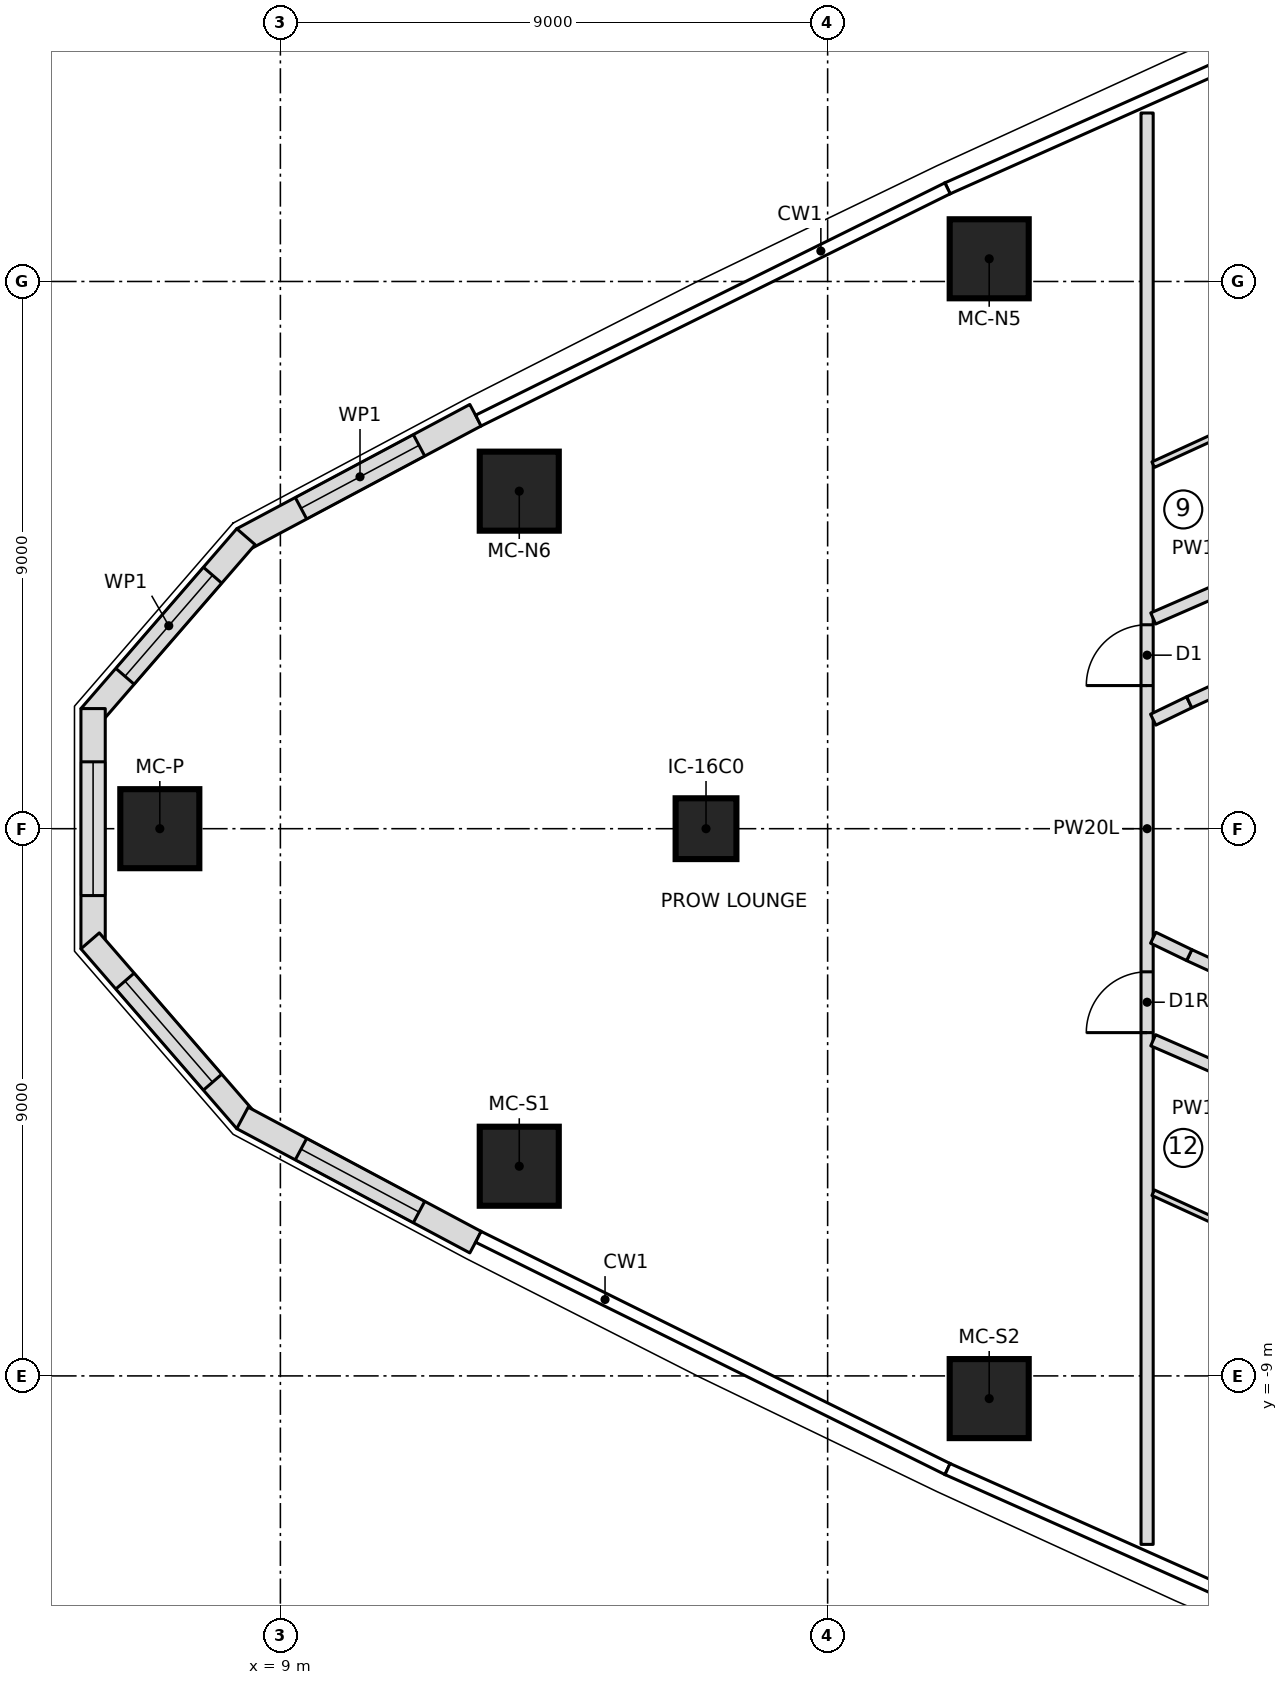
"""IFC4 building model, lengths in metres.
Left out: names, types, materials, properties, quantities, classifications, styles, units other than length and angle.
Written with IfcOpenShell. Run it as: python <this file> out.ifc"""

import sys

from ifc_helpers import new_model, si_unit, direction, frame, frame_2d, origin, origin_2d, place, context, subcontext, project, spatial, polyline, rectangle, outline, extrude, element, fill, save


model = new_model("IFC4")
c1 = context("Model", 3, precision=1e-05, world=origin(), true_north=direction((0.0, 1.0)))
c2 = subcontext(c1, "Body", "Model", "MODEL_VIEW")
j1 = project(units=[si_unit("LENGTHUNIT", "METRE"), si_unit("PLANEANGLEUNIT", "RADIAN")], contexts=[c1])
p1 = place(None, origin())
s1 = spatial("IfcSite", under=j1, at=p1, CompositionType="ELEMENT")
p2 = place(p1, origin())
s2 = spatial("IfcBuilding", under=s1, at=p2, CompositionType="ELEMENT")
p3 = place(p2, frame((0.0, 0.0, 189.7)))
s3 = spatial("IfcBuildingStorey", under=s2, at=p3, CompositionType="ELEMENT", Elevation=189.7)
for number, where, z_axis, x_axis in (
    (1, (7.017, 0.0, 0.0), (0.0, 0.0, 1.0), (1.0, 0.0, 0.0)),
    (2, (12.929, -5.552, 0.0), (0.0, 0.0, 1.0), (1.0, 0.0, 0.0)),
    (3, (20.657, -9.373, 0.0), (0.0, 0.0, 1.0), (1.0, 0.0, 0.0)),
    (4, (20.657, 9.373, 0.0), (0.0, 0.0, 1.0), (1.0, 0.0, 0.0)),
    (5, (12.929, 5.552, 0.0), (0.0, 0.0, 1.0), (1.0, 0.0, 0.0)),
):
    element("IfcColumn", number, at=place(p3, frame(where, z_axis=z_axis, x_axis=x_axis)), inside=s3, PredefinedType="COLUMN", context=c2, shape_type="SweptSolid", body=[
        extrude(rectangle(XDim=1.3, YDim=1.3, at=origin_2d()), origin(), (0.0, 0.0, 1.0), 3.55),
    ])
p4 = place(p3, frame((16.0, 0.0, 0.0), z_axis=(0.0, 0.0, 1.0), x_axis=(1.0, 0.0, 0.0)))
e6 = element("IfcColumn", 6, at=p4, inside=s3, PredefinedType="COLUMN", context=c2, shape_type="SweptSolid", body=[
    extrude(rectangle(XDim=1.0, YDim=1.0, at=origin_2d()), origin(), (0.0, 0.0, 1.0), 3.55),
])
p5 = place(p3, frame((12.21, 6.801, 0.0), z_axis=(0.0, 0.0, 1.0), x_axis=(-0.882385889746, -0.470526451518, 0.0)))
e7 = element("IfcWall", 7, at=p5, inside=s3, PredefinedType="NOTDEFINED", context=c2, shape_type="SweptSolid", body=[
    extrude(outline(polyline([(0.0, -0.2), (4.344, -0.2), (4.27, 0.2), (0.0, 0.2), (0.0, -0.2)])), origin(), (0.0, 0.0, 1.0), 3.25),
])
p6 = place(p5, frame((1.053, 0.0, 0.6)))
e8 = element("IfcOpeningElement", 8, at=p6, cuts=e7, PredefinedType="OPENING", context=c2, shape_type="SweptSolid", body=[
    extrude(outline(polyline([(0.0, 1.35), (0.084, 1.771), (0.322, 2.128), (0.679, 2.366), (1.1, 2.45), (1.521, 2.366), (1.878, 2.128), (2.116, 1.771), (2.2, 1.35), (2.2, 1.1), (2.116, 0.679), (1.878, 0.322), (1.521, 0.084), (1.1, 0.0), (0.679, 0.084), (0.322, 0.322), (0.084, 0.679), (0.0, 1.1), (0.0, 1.35)])), frame((0.0, 0.21, 0.0), z_axis=(0.0, -1.0, 0.0), x_axis=(1.0, 0.0, 0.0)), (0.0, 0.0, 1.0), 0.42),
])
p7 = place(p3, frame((8.409, 4.774, 0.0), z_axis=(0.0, 0.0, 1.0), x_axis=(-0.654759384203, -0.755837382509, 0.0)))
e9 = element("IfcWall", 9, at=p7, inside=s3, PredefinedType="NOTDEFINED", context=c2, shape_type="SweptSolid", body=[
    extrude(outline(polyline([(-0.037, -0.2), (3.876, -0.2), (3.727, 0.2), (0.037, 0.2), (-0.037, -0.2)])), origin(), (0.0, 0.0, 1.0), 3.25),
])
p8 = place(p7, frame((0.801, 0.0, 0.6)))
e10 = element("IfcOpeningElement", 10, at=p8, cuts=e9, PredefinedType="OPENING", context=c2, shape_type="SweptSolid", body=[
    extrude(outline(polyline([(0.0, 1.35), (0.084, 1.771), (0.322, 2.128), (0.679, 2.366), (1.1, 2.45), (1.521, 2.366), (1.878, 2.128), (2.116, 1.771), (2.2, 1.35), (2.2, 1.1), (2.116, 0.679), (1.878, 0.322), (1.521, 0.084), (1.1, 0.0), (0.679, 0.084), (0.322, 0.322), (0.084, 0.679), (0.0, 1.1), (0.0, 1.35)])), frame((0.0, 0.21, 0.0), z_axis=(0.0, -1.0, 0.0), x_axis=(1.0, 0.0, 0.0)), (0.0, 0.0, 1.0), 0.42),
])
p9 = place(p3, frame((5.92, 1.901, 0.0), z_axis=(0.0, 0.0, 1.0), x_axis=(0.0, -1.0, 0.0)))
e11 = element("IfcWall", 11, at=p9, inside=s3, PredefinedType="NOTDEFINED", context=c2, shape_type="SweptSolid", body=[
    extrude(outline(polyline([(-0.075, -0.2), (3.876, -0.2), (3.727, 0.2), (0.075, 0.2), (-0.075, -0.2)])), origin(), (0.0, 0.0, 1.0), 3.25),
])
p10 = place(p9, frame((0.801, 0.0, 0.6)))
e12 = element("IfcOpeningElement", 12, at=p10, cuts=e11, PredefinedType="OPENING", context=c2, shape_type="SweptSolid", body=[
    extrude(outline(polyline([(0.0, 1.35), (0.084, 1.771), (0.322, 2.128), (0.679, 2.366), (1.1, 2.45), (1.521, 2.366), (1.878, 2.128), (2.116, 1.771), (2.2, 1.35), (2.2, 1.1), (2.116, 0.679), (1.878, 0.322), (1.521, 0.084), (1.1, 0.0), (0.679, 0.084), (0.322, 0.322), (0.084, 0.679), (0.0, 1.1), (0.0, 1.35)])), frame((0.0, 0.21, 0.0), z_axis=(0.0, -1.0, 0.0), x_axis=(1.0, 0.0, 0.0)), (0.0, 0.0, 1.0), 0.42),
])
p11 = place(p3, frame((5.92, -1.901, 0.0), z_axis=(0.0, 0.0, 1.0), x_axis=(0.654759384203, -0.755837382509, 0.0)))
e13 = element("IfcWall", 13, at=p11, inside=s3, PredefinedType="NOTDEFINED", context=c2, shape_type="SweptSolid", body=[
    extrude(outline(polyline([(-0.075, -0.2), (3.839, -0.2), (3.765, 0.2), (0.075, 0.2), (-0.075, -0.2)])), origin(), (0.0, 0.0, 1.0), 3.25),
])
p12 = place(p11, frame((0.801, 0.0, 0.6)))
e14 = element("IfcOpeningElement", 14, at=p12, cuts=e13, PredefinedType="OPENING", context=c2, shape_type="SweptSolid", body=[
    extrude(outline(polyline([(0.0, 1.35), (0.084, 1.771), (0.322, 2.128), (0.679, 2.366), (1.1, 2.45), (1.521, 2.366), (1.878, 2.128), (2.116, 1.771), (2.2, 1.35), (2.2, 1.1), (2.116, 0.679), (1.878, 0.322), (1.521, 0.084), (1.1, 0.0), (0.679, 0.084), (0.322, 0.322), (0.084, 0.679), (0.0, 1.1), (0.0, 1.35)])), frame((0.0, 0.21, 0.0), z_axis=(0.0, -1.0, 0.0), x_axis=(1.0, 0.0, 0.0)), (0.0, 0.0, 1.0), 0.42),
])
p13 = place(p3, frame((8.409, -4.774, 0.0), z_axis=(0.0, 0.0, 1.0), x_axis=(0.882385889746, -0.470526451518, 0.0)))
e15 = element("IfcWall", 15, at=p13, inside=s3, PredefinedType="NOTDEFINED", context=c2, shape_type="SweptSolid", body=[
    extrude(outline(polyline([(-0.037, -0.2), (4.307, -0.2), (4.307, 0.2), (0.037, 0.2), (-0.037, -0.2)])), origin(), (0.0, 0.0, 1.0), 3.25),
])
p14 = place(p13, frame((1.053, 0.0, 0.6)))
e16 = element("IfcOpeningElement", 16, at=p14, cuts=e15, PredefinedType="OPENING", context=c2, shape_type="SweptSolid", body=[
    extrude(outline(polyline([(0.0, 1.35), (0.084, 1.771), (0.322, 2.128), (0.679, 2.366), (1.1, 2.45), (1.521, 2.366), (1.878, 2.128), (2.116, 1.771), (2.2, 1.35), (2.2, 1.1), (2.116, 0.679), (1.878, 0.322), (1.521, 0.084), (1.1, 0.0), (0.679, 0.084), (0.322, 0.322), (0.084, 0.679), (0.0, 1.1), (0.0, 1.35)])), frame((0.0, 0.21, 0.0), z_axis=(0.0, -1.0, 0.0), x_axis=(1.0, 0.0, 0.0)), (0.0, 0.0, 1.0), 0.42),
])
p15 = place(p3, frame((23.254, -11.771, 0.0), z_axis=(0.0, 0.0, 1.0), x_axis=(0.0, 1.0, 0.0)))
e17 = element("IfcWall", 17, at=p15, inside=s3, PredefinedType="PARTITIONING", context=c2, shape_type="SweptSolid", body=[
    extrude(rectangle(XDim=23.542, YDim=0.2, at=frame_2d((11.771, 0.0))), origin(), (0.0, 0.0, 1.0), 3.25),
])
p16 = place(p15, frame((14.125, 0.0, 0.0)))
e18 = element("IfcOpeningElement", 18, at=p16, cuts=e17, PredefinedType="OPENING", context=c2, shape_type="SweptSolid", body=[
    extrude(rectangle(XDim=1.0, YDim=2.1, at=frame_2d((0.5, 1.05))), frame((0.0, 0.11, 0.0), z_axis=(0.0, -1.0, 0.0), x_axis=(1.0, 0.0, 0.0)), (0.0, 0.0, 1.0), 0.22),
])
p17 = place(p15, frame((8.417, 0.0, 0.0)))
e19 = element("IfcOpeningElement", 19, at=p17, cuts=e17, PredefinedType="OPENING", context=c2, shape_type="SweptSolid", body=[
    extrude(rectangle(XDim=1.0, YDim=2.1, at=frame_2d((0.5, 1.05))), frame((0.0, 0.11, 0.0), z_axis=(0.0, -1.0, 0.0), x_axis=(1.0, 0.0, 0.0)), (0.0, 0.0, 1.0), 0.22),
])
p18 = place(p3, frame((23.354, 3.458, 0.0), z_axis=(0.0, 0.0, 1.0), x_axis=(0.916719487908, 0.399531451189, 0.0)))
e20 = element("IfcWall", 20, at=p18, inside=s3, PredefinedType="PARTITIONING", context=c2, shape_type="SweptSolid", body=[
    extrude(rectangle(XDim=11.404, YDim=0.2, at=frame_2d((5.702, 0.0))), origin(), (0.0, 0.0, 1.0), 3.25),
])
p19 = place(p18, frame((3.05, 0.0, 0.0)))
e21 = element("IfcOpeningElement", 21, at=p19, cuts=e20, PredefinedType="OPENING", context=c2, shape_type="SweptSolid", body=[
    extrude(rectangle(XDim=1.0, YDim=2.1, at=frame_2d((0.5, 1.05))), frame((0.0, 0.11, 0.0), z_axis=(0.0, -1.0, 0.0), x_axis=(1.0, 0.0, 0.0)), (0.0, 0.0, 1.0), 0.22),
])
p20 = place(p3, frame((23.354, 5.987, 0.0), z_axis=(0.0, 0.0, 1.0), x_axis=(0.909158902999, 0.416449383597, 0.0)))
e22 = element("IfcWall", 22, at=p20, inside=s3, PredefinedType="PARTITIONING", context=c2, shape_type="SweptSolid", body=[
    extrude(rectangle(XDim=1.556, YDim=0.1, at=frame_2d((0.778, 0.0))), origin(), (0.0, 0.0, 1.0), 3.25),
])
p21 = place(p3, frame((23.354, -3.479, 0.0), z_axis=(0.0, 0.0, 1.0), x_axis=(0.916726746983, -0.399514794926, 0.0)))
e23 = element("IfcWall", 23, at=p21, inside=s3, PredefinedType="PARTITIONING", context=c2, shape_type="SweptSolid", body=[
    extrude(rectangle(XDim=11.396, YDim=0.2, at=frame_2d((5.698, 0.0))), origin(), (0.0, 0.0, 1.0), 3.25),
])
p22 = place(p21, frame((3.05, 0.0, 0.0)))
e24 = element("IfcOpeningElement", 24, at=p22, cuts=e23, PredefinedType="OPENING", context=c2, shape_type="SweptSolid", body=[
    extrude(rectangle(XDim=1.0, YDim=2.1, at=frame_2d((0.5, 1.05))), frame((0.0, 0.11, 0.0), z_axis=(0.0, -1.0, 0.0), x_axis=(1.0, 0.0, 0.0)), (0.0, 0.0, 1.0), 0.22),
])
p23 = place(p3, frame((24.769, -6.635, 0.0), z_axis=(0.0, 0.0, 1.0), x_axis=(-0.909158902999, 0.416449383597, 0.0)))
e25 = element("IfcWall", 25, at=p23, inside=s3, PredefinedType="PARTITIONING", context=c2, shape_type="SweptSolid", body=[
    extrude(rectangle(XDim=1.556, YDim=0.1, at=frame_2d((0.778, 0.0))), origin(), (0.0, 0.0, 1.0), 3.25),
])
p24 = place(p3, frame((27.69, -3.793, 0.0), z_axis=(0.0, 0.0, 1.0), x_axis=(-0.909180834404, 0.416401501382, 0.0)))
e26 = element("IfcWall", 26, at=p24, inside=s3, PredefinedType="PARTITIONING", context=c2, shape_type="SweptSolid", body=[
    extrude(rectangle(XDim=4.117, YDim=0.2, at=frame_2d((2.059, 0.0))), origin(), (0.0, 0.0, 1.0), 3.25),
])
p25 = place(p24, frame((1.559, 0.0, 0.0)))
e27 = element("IfcOpeningElement", 27, at=p25, cuts=e26, PredefinedType="OPENING", context=c2, shape_type="SweptSolid", body=[
    extrude(rectangle(XDim=1.0, YDim=2.1, at=frame_2d((0.5, 1.05))), frame((0.0, 0.11, 0.0), z_axis=(0.0, -1.0, 0.0), x_axis=(1.0, 0.0, 0.0)), (0.0, 0.0, 1.0), 0.22),
])
for number, where, z_axis, x_axis in (
    (28, (23.947, -2.079, 0.0), (0.0, 0.0, 1.0), (-0.901, 0.435, 0.0)),
    (29, (23.354, 1.793, 0.0), (0.0, 0.0, 1.0), (0.901, 0.435, 0.0)),
):
    element("IfcWall", number, at=place(p3, frame(where, z_axis=z_axis, x_axis=x_axis)), inside=s3, PredefinedType="PARTITIONING", context=c2, shape_type="SweptSolid", body=[
        extrude(rectangle(XDim=0.658, YDim=0.2, at=frame_2d((0.329, 0.0))), origin(), (0.0, 0.0, 1.0), 3.25),
    ])
p26 = place(p3, frame((23.947, 2.079, 0.0), z_axis=(0.0, 0.0, 1.0), x_axis=(0.909180834404, 0.416401501382, 0.0)))
e30 = element("IfcWall", 30, at=p26, inside=s3, PredefinedType="PARTITIONING", context=c2, shape_type="SweptSolid", body=[
    extrude(rectangle(XDim=4.117, YDim=0.2, at=frame_2d((2.059, 0.0))), origin(), (0.0, 0.0, 1.0), 3.25),
])
p27 = place(p6, origin())
e31 = element("IfcWindow", 31, at=p27, inside=s3, PartitioningType="SINGLE_PANEL", PredefinedType="WINDOW", context=c2, shape_type="SweptSolid", body=[
    extrude(outline(polyline([(0.0, 1.35), (0.084, 1.771), (0.322, 2.128), (0.679, 2.366), (1.1, 2.45), (1.521, 2.366), (1.878, 2.128), (2.116, 1.771), (2.2, 1.35), (2.2, 1.1), (2.116, 0.679), (1.878, 0.322), (1.521, 0.084), (1.1, 0.0), (0.679, 0.084), (0.322, 0.322), (0.084, 0.679), (0.0, 1.1), (0.0, 1.35)])), frame((0.0, 0.17, 0.0), z_axis=(0.0, -1.0, 0.0), x_axis=(1.0, 0.0, 0.0)), (0.0, 0.0, 1.0), 0.06),
])
fill(e8, e31)
p28 = place(p8, origin())
e32 = element("IfcWindow", 32, at=p28, inside=s3, PartitioningType="SINGLE_PANEL", PredefinedType="WINDOW", context=c2, shape_type="SweptSolid", body=[
    extrude(outline(polyline([(0.0, 1.35), (0.084, 1.771), (0.322, 2.128), (0.679, 2.366), (1.1, 2.45), (1.521, 2.366), (1.878, 2.128), (2.116, 1.771), (2.2, 1.35), (2.2, 1.1), (2.116, 0.679), (1.878, 0.322), (1.521, 0.084), (1.1, 0.0), (0.679, 0.084), (0.322, 0.322), (0.084, 0.679), (0.0, 1.1), (0.0, 1.35)])), frame((0.0, 0.17, 0.0), z_axis=(0.0, -1.0, 0.0), x_axis=(1.0, 0.0, 0.0)), (0.0, 0.0, 1.0), 0.06),
])
fill(e10, e32)
p29 = place(p10, origin())
e33 = element("IfcWindow", 33, at=p29, inside=s3, PartitioningType="SINGLE_PANEL", PredefinedType="WINDOW", context=c2, shape_type="SweptSolid", body=[
    extrude(outline(polyline([(0.0, 1.35), (0.084, 1.771), (0.322, 2.128), (0.679, 2.366), (1.1, 2.45), (1.521, 2.366), (1.878, 2.128), (2.116, 1.771), (2.2, 1.35), (2.2, 1.1), (2.116, 0.679), (1.878, 0.322), (1.521, 0.084), (1.1, 0.0), (0.679, 0.084), (0.322, 0.322), (0.084, 0.679), (0.0, 1.1), (0.0, 1.35)])), frame((0.0, 0.17, 0.0), z_axis=(0.0, -1.0, 0.0), x_axis=(1.0, 0.0, 0.0)), (0.0, 0.0, 1.0), 0.06),
])
fill(e12, e33)
p30 = place(p12, origin())
e34 = element("IfcWindow", 34, at=p30, inside=s3, PartitioningType="SINGLE_PANEL", PredefinedType="WINDOW", context=c2, shape_type="SweptSolid", body=[
    extrude(outline(polyline([(0.0, 1.35), (0.084, 1.771), (0.322, 2.128), (0.679, 2.366), (1.1, 2.45), (1.521, 2.366), (1.878, 2.128), (2.116, 1.771), (2.2, 1.35), (2.2, 1.1), (2.116, 0.679), (1.878, 0.322), (1.521, 0.084), (1.1, 0.0), (0.679, 0.084), (0.322, 0.322), (0.084, 0.679), (0.0, 1.1), (0.0, 1.35)])), frame((0.0, 0.17, 0.0), z_axis=(0.0, -1.0, 0.0), x_axis=(1.0, 0.0, 0.0)), (0.0, 0.0, 1.0), 0.06),
])
fill(e14, e34)
p31 = place(p14, origin())
e35 = element("IfcWindow", 35, at=p31, inside=s3, PartitioningType="SINGLE_PANEL", PredefinedType="WINDOW", context=c2, shape_type="SweptSolid", body=[
    extrude(outline(polyline([(0.0, 1.35), (0.084, 1.771), (0.322, 2.128), (0.679, 2.366), (1.1, 2.45), (1.521, 2.366), (1.878, 2.128), (2.116, 1.771), (2.2, 1.35), (2.2, 1.1), (2.116, 0.679), (1.878, 0.322), (1.521, 0.084), (1.1, 0.0), (0.679, 0.084), (0.322, 0.322), (0.084, 0.679), (0.0, 1.1), (0.0, 1.35)])), frame((0.0, 0.17, 0.0), z_axis=(0.0, -1.0, 0.0), x_axis=(1.0, 0.0, 0.0)), (0.0, 0.0, 1.0), 0.06),
])
fill(e16, e35)
p32 = place(p16, origin())
e36 = element("IfcDoor", 36, at=p32, inside=s3, OperationType="SINGLE_SWING_LEFT", PredefinedType="DOOR", context=c2, shape_type="SweptSolid", body=[
    extrude(rectangle(XDim=1.0, YDim=2.1, at=frame_2d((0.5, 1.05))), frame((0.0, 0.025, 0.0), z_axis=(0.0, -1.0, 0.0), x_axis=(1.0, 0.0, 0.0)), (0.0, 0.0, 1.0), 0.05),
])
fill(e18, e36)
p33 = place(p17, origin())
e37 = element("IfcDoor", 37, at=p33, inside=s3, OperationType="SINGLE_SWING_RIGHT", PredefinedType="DOOR", context=c2, shape_type="SweptSolid", body=[
    extrude(rectangle(XDim=1.0, YDim=2.1, at=frame_2d((0.5, 1.05))), frame((0.0, 0.025, 0.0), z_axis=(0.0, -1.0, 0.0), x_axis=(1.0, 0.0, 0.0)), (0.0, 0.0, 1.0), 0.05),
])
fill(e19, e37)
save(model, sys.argv[1])
